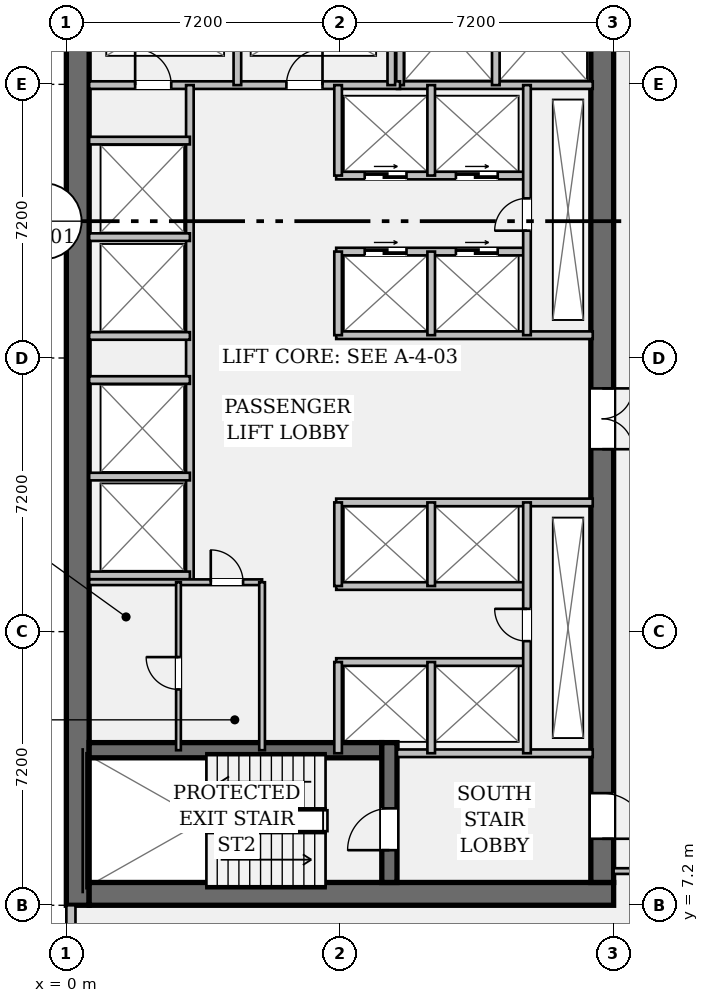
"""IFC4 building model, lengths in metres.
Left out: names, types, materials, properties, quantities, classifications, styles, units other than length and angle.
Written with IfcOpenShell. Run it as: python <this file> out.ifc"""

import sys

from ifc_helpers import new_model, si_unit, direction, frame, frame_2d, origin, place, context, subcontext, project, spatial, rectangle, extrude, element, fill, save


model = new_model("IFC4")
c1 = context("Model", 3, precision=1e-05, world=origin(), true_north=direction((0.0, 1.0)))
c2 = subcontext(c1, "Body", "Model", "MODEL_VIEW")
j1 = project(units=[si_unit("LENGTHUNIT", "METRE"), si_unit("PLANEANGLEUNIT", "RADIAN")], contexts=[c1])
p1 = place(None, origin())
s1 = spatial("IfcSite", under=j1, at=p1, CompositionType="ELEMENT")
p2 = place(p1, origin())
s2 = spatial("IfcBuilding", under=s1, at=p2, CompositionType="ELEMENT")
p3 = place(p2, frame((0.0, 0.0, 5.25)))
s3 = spatial("IfcBuildingStorey", under=s2, at=p3, CompositionType="ELEMENT", Elevation=5.25)
p4 = place(p3, frame((0.3, 7.2, 0.0), z_axis=(0.0, 0.0, 1.0), x_axis=(0.0, 1.0, 0.0)))
e1 = element("IfcWall", 1, at=p4, inside=s3, PredefinedType="SHEAR", context=c2, shape_type="SweptSolid", body=[
    extrude(rectangle(XDim=28.8, YDim=0.6, at=frame_2d((14.4, 0.0))), origin(), (0.0, 0.0, 1.0), 3.9),
])
p5 = place(p3, frame((0.6, 7.5, 0.0), z_axis=(0.0, 0.0, 1.0), x_axis=(1.0, 0.0, 0.0)))
e2 = element("IfcWall", 2, at=p5, inside=s3, PredefinedType="SHEAR", context=c2, shape_type="SweptSolid", body=[
    extrude(rectangle(XDim=13.8, YDim=0.6, at=frame_2d((6.9, 0.0))), origin(), (0.0, 0.0, 1.0), 3.9),
])
p6 = place(p3, frame((14.1, 35.4, 0.0), z_axis=(0.0, 0.0, 1.0), x_axis=(0.0, -1.0, 0.0)))
e3 = element("IfcWall", 3, at=p6, inside=s3, PredefinedType="SHEAR", context=c2, shape_type="SweptSolid", body=[
    extrude(rectangle(XDim=27.6, YDim=0.6, at=frame_2d((13.8, 0.0))), origin(), (0.0, 0.0, 1.0), 3.9),
])
p7 = place(p6, frame((1.3, 0.0, 0.0)))
e4 = element("IfcOpeningElement", 4, at=p7, cuts=e3, PredefinedType="OPENING", context=c2, shape_type="SweptSolid", body=[
    extrude(rectangle(XDim=1.2, YDim=2.15, at=frame_2d((0.6, 1.075))), frame((0.0, 0.312, 0.0), z_axis=(0.0, -1.0, 0.0), x_axis=(1.0, 0.0, 0.0)), (0.0, 0.0, 1.0), 0.624),
])
p8 = place(p6, frame((25.25, 0.0, 0.0)))
e5 = element("IfcOpeningElement", 5, at=p8, cuts=e3, PredefinedType="OPENING", context=c2, shape_type="SweptSolid", body=[
    extrude(rectangle(XDim=1.2, YDim=2.15, at=frame_2d((0.6, 1.075))), frame((0.0, 0.312, 0.0), z_axis=(0.0, -1.0, 0.0), x_axis=(1.0, 0.0, 0.0)), (0.0, 0.0, 1.0), 0.624),
])
p9 = place(p6, frame((14.6, 0.0, 0.0)))
e6 = element("IfcOpeningElement", 6, at=p9, cuts=e3, PredefinedType="OPENING", context=c2, shape_type="SweptSolid", body=[
    extrude(rectangle(XDim=1.6, YDim=2.2, at=frame_2d((0.8, 1.1))), frame((0.0, 0.312, 0.0), z_axis=(0.0, -1.0, 0.0), x_axis=(1.0, 0.0, 0.0)), (0.0, 0.0, 1.0), 0.624),
])
p10 = place(p3, frame((0.6, 11.28, 0.0), z_axis=(0.0, 0.0, 1.0), x_axis=(1.0, 0.0, 0.0)))
e7 = element("IfcWall", 7, at=p10, inside=s3, PredefinedType="SHEAR", context=c2, shape_type="SweptSolid", body=[
    extrude(rectangle(XDim=7.7, YDim=0.4, at=frame_2d((3.85, 0.0))), origin(), (0.0, 0.0, 1.0), 3.9),
])
p11 = place(p3, frame((8.5, 7.8, 0.0), z_axis=(0.0, 0.0, 1.0), x_axis=(0.0, 1.0, 0.0)))
e8 = element("IfcWall", 8, at=p11, inside=s3, PredefinedType="SHEAR", context=c2, shape_type="SweptSolid", body=[
    extrude(rectangle(XDim=3.68, YDim=0.4, at=frame_2d((1.84, 0.0))), origin(), (0.0, 0.0, 1.0), 3.9),
])
p12 = place(p11, frame((0.85, 0.0, 0.0)))
e9 = element("IfcOpeningElement", 9, at=p12, cuts=e8, PredefinedType="OPENING", context=c2, shape_type="SweptSolid", body=[
    extrude(rectangle(XDim=1.1, YDim=2.15, at=frame_2d((0.55, 1.075))), frame((0.0, 0.212, 0.0), z_axis=(0.0, -1.0, 0.0), x_axis=(1.0, 0.0, 0.0)), (0.0, 0.0, 1.0), 0.424),
])
p13 = place(p3, frame((0.12, 2.82, 0.0), z_axis=(0.0, 0.0, 1.0), x_axis=(0.0, 1.0, 0.0)))
e10 = element("IfcWall", 10, at=p13, inside=s3, PredefinedType="STANDARD", context=c2, shape_type="SweptSolid", body=[
    extrude(rectangle(XDim=4.38, YDim=0.24, at=frame_2d((2.19, 0.0))), origin(), (0.0, 0.0, 1.0), 3.9),
])
p14 = place(p13, frame((0.84, 0.0, 0.95)))
e11 = element("IfcOpeningElement", 11, at=p14, cuts=e10, PredefinedType="OPENING", context=c2, shape_type="SweptSolid", body=[
    extrude(rectangle(XDim=2.7, YDim=1.65, at=frame_2d((1.35, 0.825))), frame((0.0, 0.132, 0.0), z_axis=(0.0, -1.0, 0.0), x_axis=(1.0, 0.0, 0.0)), (0.0, 0.0, 1.0), 0.264),
])
for number, where, z_axis, x_axis in (
    (12, (8.7, 11.2, 0.0), (0.0, 0.0, 1.0), (1.0, 0.0, 0.0)),
    (13, (8.7, 28.78, 0.0), (0.0, 0.0, 1.0), (1.0, 0.0, 0.0)),
):
    element("IfcWall", number, at=place(p3, frame(where, z_axis=z_axis, x_axis=x_axis)), inside=s3, PredefinedType="PARTITIONING", context=c2, shape_type="SweptSolid", body=[
        extrude(rectangle(XDim=5.15, YDim=0.2, at=frame_2d((2.575, 0.0))), origin(), (0.0, 0.0, 1.0), 3.9),
    ])
for number, where, z_axis, x_axis in (
    (14, (8.78, 28.78, 0.0), (0.0, 0.0, 1.0), (0.0, 1.0, 0.0)),
    (15, (11.3, 28.78, 0.0), (0.0, 0.0, 1.0), (0.0, 1.0, 0.0)),
):
    element("IfcWall", number, at=place(p3, frame(where, z_axis=z_axis, x_axis=x_axis)), inside=s3, PredefinedType="PARTITIONING", context=c2, shape_type="SweptSolid", body=[
        extrude(rectangle(XDim=3.1, YDim=0.2, at=frame_2d((1.55, 0.0))), origin(), (0.0, 0.0, 1.0), 3.9),
    ])
p15 = place(p3, frame((0.6, 28.78, 0.0), z_axis=(0.0, 0.0, 1.0), x_axis=(1.0, 0.0, 0.0)))
e16 = element("IfcWall", 16, at=p15, inside=s3, PredefinedType="PARTITIONING", context=c2, shape_type="SweptSolid", body=[
    extrude(rectangle(XDim=8.18, YDim=0.2, at=frame_2d((4.09, 0.0))), origin(), (0.0, 0.0, 1.0), 3.9),
])
p16 = place(p15, frame((1.21, 0.0, 0.0)))
e17 = element("IfcOpeningElement", 17, at=p16, cuts=e16, PredefinedType="OPENING", context=c2, shape_type="SweptSolid", body=[
    extrude(rectangle(XDim=0.95, YDim=2.15, at=frame_2d((0.475, 1.075))), frame((0.0, 0.112, 0.0), z_axis=(0.0, -1.0, 0.0), x_axis=(1.0, 0.0, 0.0)), (0.0, 0.0, 1.0), 0.224),
])
p17 = place(p15, frame((5.19, 0.0, 0.0)))
e18 = element("IfcOpeningElement", 18, at=p17, cuts=e16, PredefinedType="OPENING", context=c2, shape_type="SweptSolid", body=[
    extrude(rectangle(XDim=0.95, YDim=2.15, at=frame_2d((0.475, 1.075))), frame((0.0, 0.112, 0.0), z_axis=(0.0, -1.0, 0.0), x_axis=(1.0, 0.0, 0.0)), (0.0, 0.0, 1.0), 0.224),
])
for number, where, z_axis, x_axis in (
    (19, (4.5, 28.78, 0.0), (0.0, 0.0, 1.0), (0.0, 1.0, 0.0)),
    (20, (8.55, 28.78, 0.0), (0.0, 0.0, 1.0), (0.0, 1.0, 0.0)),
):
    element("IfcWall", number, at=place(p3, frame(where, z_axis=z_axis, x_axis=x_axis)), inside=s3, PredefinedType="PARTITIONING", context=c2, shape_type="SweptSolid", body=[
        extrude(rectangle(XDim=2.94, YDim=0.2, at=frame_2d((1.47, 0.0))), origin(), (0.0, 0.0, 1.0), 3.9),
    ])
p18 = place(p3, frame((3.25, 15.7, 0.0), z_axis=(0.0, 0.0, 1.0), x_axis=(0.0, 1.0, 0.0)))
e21 = element("IfcWall", 21, at=p18, inside=s3, PredefinedType="PARTITIONING", context=c2, shape_type="SweptSolid", body=[
    extrude(rectangle(XDim=13.08, YDim=0.2, at=frame_2d((6.54, 0.0))), origin(), (0.0, 0.0, 1.0), 3.9),
])
for number, where, z_axis, x_axis in (
    (22, (0.6, 15.88, 0.0), (0.0, 0.0, 1.0), (1.0, 0.0, 0.0)),
    (23, (0.6, 18.48, 0.0), (0.0, 0.0, 1.0), (1.0, 0.0, 0.0)),
    (24, (0.6, 22.18, 0.0), (0.0, 0.0, 1.0), (1.0, 0.0, 0.0)),
    (25, (0.6, 24.78, 0.0), (0.0, 0.0, 1.0), (1.0, 0.0, 0.0)),
    (26, (0.6, 21.02, 0.0), (0.0, 0.0, 1.0), (1.0, 0.0, 0.0)),
    (27, (0.6, 27.32, 0.0), (0.0, 0.0, 1.0), (1.0, 0.0, 0.0)),
):
    element("IfcWall", number, at=place(p3, frame(where, z_axis=z_axis, x_axis=x_axis)), inside=s3, PredefinedType="PARTITIONING", context=c2, shape_type="SweptSolid", body=[
        extrude(rectangle(XDim=2.65, YDim=0.2, at=frame_2d((1.325, 0.0))), origin(), (0.0, 0.0, 1.0), 3.9),
    ])
p19 = place(p3, frame((7.1, 22.2, 0.0), z_axis=(0.0, 0.0, 1.0), x_axis=(1.0, 0.0, 0.0)))
e28 = element("IfcWall", 28, at=p19, inside=s3, PredefinedType="PARTITIONING", context=c2, shape_type="SweptSolid", body=[
    extrude(rectangle(XDim=6.75, YDim=0.2, at=frame_2d((3.375, 0.0))), origin(), (0.0, 0.0, 1.0), 3.9),
])
p20 = place(p3, frame((7.1, 24.4, 0.0), z_axis=(0.0, 0.0, 1.0), x_axis=(1.0, 0.0, 0.0)))
e29 = element("IfcWall", 29, at=p20, inside=s3, PredefinedType="PARTITIONING", context=c2, shape_type="SweptSolid", body=[
    extrude(rectangle(XDim=5.02, YDim=0.2, at=frame_2d((2.51, 0.0))), origin(), (0.0, 0.0, 1.0), 3.9),
])
p21 = place(p20, frame((0.75, 0.0, 0.0)))
e30 = element("IfcOpeningElement", 30, at=p21, cuts=e29, PredefinedType="OPENING", context=c2, shape_type="SweptSolid", body=[
    extrude(rectangle(XDim=1.1, YDim=2.2, at=frame_2d((0.55, 1.1))), frame((0.0, 0.112, 0.0), z_axis=(0.0, -1.0, 0.0), x_axis=(1.0, 0.0, 0.0)), (0.0, 0.0, 1.0), 0.224),
])
p22 = place(p20, frame((3.15, 0.0, 0.0)))
e31 = element("IfcOpeningElement", 31, at=p22, cuts=e29, PredefinedType="OPENING", context=c2, shape_type="SweptSolid", body=[
    extrude(rectangle(XDim=1.1, YDim=2.2, at=frame_2d((0.55, 1.1))), frame((0.0, 0.112, 0.0), z_axis=(0.0, -1.0, 0.0), x_axis=(1.0, 0.0, 0.0)), (0.0, 0.0, 1.0), 0.224),
])
p23 = place(p3, frame((7.1, 26.4, 0.0), z_axis=(0.0, 0.0, 1.0), x_axis=(1.0, 0.0, 0.0)))
e32 = element("IfcWall", 32, at=p23, inside=s3, PredefinedType="PARTITIONING", context=c2, shape_type="SweptSolid", body=[
    extrude(rectangle(XDim=5.02, YDim=0.2, at=frame_2d((2.51, 0.0))), origin(), (0.0, 0.0, 1.0), 3.9),
])
p24 = place(p23, frame((0.75, 0.0, 0.0)))
e33 = element("IfcOpeningElement", 33, at=p24, cuts=e32, PredefinedType="OPENING", context=c2, shape_type="SweptSolid", body=[
    extrude(rectangle(XDim=1.1, YDim=2.2, at=frame_2d((0.55, 1.1))), frame((0.0, 0.112, 0.0), z_axis=(0.0, -1.0, 0.0), x_axis=(1.0, 0.0, 0.0)), (0.0, 0.0, 1.0), 0.224),
])
p25 = place(p23, frame((3.15, 0.0, 0.0)))
e34 = element("IfcOpeningElement", 34, at=p25, cuts=e32, PredefinedType="OPENING", context=c2, shape_type="SweptSolid", body=[
    extrude(rectangle(XDim=1.1, YDim=2.2, at=frame_2d((0.55, 1.1))), frame((0.0, 0.112, 0.0), z_axis=(0.0, -1.0, 0.0), x_axis=(1.0, 0.0, 0.0)), (0.0, 0.0, 1.0), 0.224),
])
p26 = place(p3, frame((7.15, 22.2, 0.0), z_axis=(0.0, 0.0, 1.0), x_axis=(0.0, 1.0, 0.0)))
e35 = element("IfcWall", 35, at=p26, inside=s3, PredefinedType="PARTITIONING", context=c2, shape_type="SweptSolid", body=[
    extrude(rectangle(XDim=2.2, YDim=0.2, at=frame_2d((1.1, 0.0))), origin(), (0.0, 0.0, 1.0), 3.9),
])
p27 = place(p3, frame((7.15, 26.4, 0.0), z_axis=(0.0, 0.0, 1.0), x_axis=(0.0, 1.0, 0.0)))
e36 = element("IfcWall", 36, at=p27, inside=s3, PredefinedType="PARTITIONING", context=c2, shape_type="SweptSolid", body=[
    extrude(rectangle(XDim=2.38, YDim=0.2, at=frame_2d((1.19, 0.0))), origin(), (0.0, 0.0, 1.0), 3.9),
])
p28 = place(p3, frame((9.6, 22.2, 0.0), z_axis=(0.0, 0.0, 1.0), x_axis=(0.0, 1.0, 0.0)))
e37 = element("IfcWall", 37, at=p28, inside=s3, PredefinedType="PARTITIONING", context=c2, shape_type="SweptSolid", body=[
    extrude(rectangle(XDim=2.2, YDim=0.2, at=frame_2d((1.1, 0.0))), origin(), (0.0, 0.0, 1.0), 3.9),
])
p29 = place(p3, frame((9.6, 26.4, 0.0), z_axis=(0.0, 0.0, 1.0), x_axis=(0.0, 1.0, 0.0)))
e38 = element("IfcWall", 38, at=p29, inside=s3, PredefinedType="PARTITIONING", context=c2, shape_type="SweptSolid", body=[
    extrude(rectangle(XDim=2.38, YDim=0.2, at=frame_2d((1.19, 0.0))), origin(), (0.0, 0.0, 1.0), 3.9),
])
p30 = place(p3, frame((12.12, 22.2, 0.0), z_axis=(0.0, 0.0, 1.0), x_axis=(0.0, 1.0, 0.0)))
e39 = element("IfcWall", 39, at=p30, inside=s3, PredefinedType="PARTITIONING", context=c2, shape_type="SweptSolid", body=[
    extrude(rectangle(XDim=6.58, YDim=0.2, at=frame_2d((3.29, 0.0))), origin(), (0.0, 0.0, 1.0), 3.9),
])
p31 = place(p30, frame((2.75, 0.0, 0.0)))
e40 = element("IfcOpeningElement", 40, at=p31, cuts=e39, PredefinedType="OPENING", context=c2, shape_type="SweptSolid", body=[
    extrude(rectangle(XDim=0.85, YDim=2.15, at=frame_2d((0.425, 1.075))), frame((0.0, 0.112, 0.0), z_axis=(0.0, -1.0, 0.0), x_axis=(1.0, 0.0, 0.0)), (0.0, 0.0, 1.0), 0.224),
])
p32 = place(p3, frame((7.1, 17.8, 0.0), z_axis=(0.0, 0.0, 1.0), x_axis=(1.0, 0.0, 0.0)))
e41 = element("IfcWall", 41, at=p32, inside=s3, PredefinedType="PARTITIONING", context=c2, shape_type="SweptSolid", body=[
    extrude(rectangle(XDim=6.75, YDim=0.2, at=frame_2d((3.375, 0.0))), origin(), (0.0, 0.0, 1.0), 3.9),
])
for number, where, z_axis, x_axis in (
    (42, (7.1, 15.6, 0.0), (0.0, 0.0, 1.0), (1.0, 0.0, 0.0)),
    (43, (7.1, 13.6, 0.0), (0.0, 0.0, 1.0), (1.0, 0.0, 0.0)),
):
    element("IfcWall", number, at=place(p3, frame(where, z_axis=z_axis, x_axis=x_axis)), inside=s3, PredefinedType="PARTITIONING", context=c2, shape_type="SweptSolid", body=[
        extrude(rectangle(XDim=5.02, YDim=0.2, at=frame_2d((2.51, 0.0))), origin(), (0.0, 0.0, 1.0), 3.9),
    ])
p33 = place(p3, frame((7.15, 15.6, 0.0), z_axis=(0.0, 0.0, 1.0), x_axis=(0.0, 1.0, 0.0)))
e44 = element("IfcWall", 44, at=p33, inside=s3, PredefinedType="PARTITIONING", context=c2, shape_type="SweptSolid", body=[
    extrude(rectangle(XDim=2.2, YDim=0.2, at=frame_2d((1.1, 0.0))), origin(), (0.0, 0.0, 1.0), 3.9),
])
p34 = place(p3, frame((7.15, 11.2, 0.0), z_axis=(0.0, 0.0, 1.0), x_axis=(0.0, 1.0, 0.0)))
e45 = element("IfcWall", 45, at=p34, inside=s3, PredefinedType="PARTITIONING", context=c2, shape_type="SweptSolid", body=[
    extrude(rectangle(XDim=2.4, YDim=0.2, at=frame_2d((1.2, 0.0))), origin(), (0.0, 0.0, 1.0), 3.9),
])
p35 = place(p3, frame((9.6, 15.6, 0.0), z_axis=(0.0, 0.0, 1.0), x_axis=(0.0, 1.0, 0.0)))
e46 = element("IfcWall", 46, at=p35, inside=s3, PredefinedType="PARTITIONING", context=c2, shape_type="SweptSolid", body=[
    extrude(rectangle(XDim=2.2, YDim=0.2, at=frame_2d((1.1, 0.0))), origin(), (0.0, 0.0, 1.0), 3.9),
])
p36 = place(p3, frame((9.6, 11.2, 0.0), z_axis=(0.0, 0.0, 1.0), x_axis=(0.0, 1.0, 0.0)))
e47 = element("IfcWall", 47, at=p36, inside=s3, PredefinedType="PARTITIONING", context=c2, shape_type="SweptSolid", body=[
    extrude(rectangle(XDim=2.4, YDim=0.2, at=frame_2d((1.2, 0.0))), origin(), (0.0, 0.0, 1.0), 3.9),
])
p37 = place(p3, frame((12.12, 11.2, 0.0), z_axis=(0.0, 0.0, 1.0), x_axis=(0.0, 1.0, 0.0)))
e48 = element("IfcWall", 48, at=p37, inside=s3, PredefinedType="PARTITIONING", context=c2, shape_type="SweptSolid", body=[
    extrude(rectangle(XDim=6.6, YDim=0.2, at=frame_2d((3.3, 0.0))), origin(), (0.0, 0.0, 1.0), 3.9),
])
p38 = place(p37, frame((2.95, 0.0, 0.0)))
e49 = element("IfcOpeningElement", 49, at=p38, cuts=e48, PredefinedType="OPENING", context=c2, shape_type="SweptSolid", body=[
    extrude(rectangle(XDim=0.85, YDim=2.15, at=frame_2d((0.425, 1.075))), frame((0.0, 0.112, 0.0), z_axis=(0.0, -1.0, 0.0), x_axis=(1.0, 0.0, 0.0)), (0.0, 0.0, 1.0), 0.224),
])
p39 = place(p3, frame((0.6, 15.7, 0.0), z_axis=(0.0, 0.0, 1.0), x_axis=(1.0, 0.0, 0.0)))
e50 = element("IfcWall", 50, at=p39, inside=s3, PredefinedType="PARTITIONING", context=c2, shape_type="SweptSolid", body=[
    extrude(rectangle(XDim=4.55, YDim=0.15, at=frame_2d((2.275, 0.0))), origin(), (0.0, 0.0, 1.0), 3.9),
])
p40 = place(p39, frame((3.2, 0.0, 0.0)))
e51 = element("IfcOpeningElement", 51, at=p40, cuts=e50, PredefinedType="OPENING", context=c2, shape_type="SweptSolid", body=[
    extrude(rectangle(XDim=0.85, YDim=2.15, at=frame_2d((0.425, 1.075))), frame((0.0, 0.087, 0.0), z_axis=(0.0, -1.0, 0.0), x_axis=(1.0, 0.0, 0.0)), (0.0, 0.0, 1.0), 0.174),
])
p41 = place(p3, frame((5.15, 11.28, 0.0), z_axis=(0.0, 0.0, 1.0), x_axis=(0.0, 1.0, 0.0)))
e52 = element("IfcWall", 52, at=p41, inside=s3, PredefinedType="PARTITIONING", context=c2, shape_type="SweptSolid", body=[
    extrude(rectangle(XDim=4.42, YDim=0.15, at=frame_2d((2.21, 0.0))), origin(), (0.0, 0.0, 1.0), 3.9),
])
p42 = place(p3, frame((2.95, 11.28, 0.0), z_axis=(0.0, 0.0, 1.0), x_axis=(0.0, 1.0, 0.0)))
e53 = element("IfcWall", 53, at=p42, inside=s3, PredefinedType="PARTITIONING", context=c2, shape_type="SweptSolid", body=[
    extrude(rectangle(XDim=4.42, YDim=0.125, at=frame_2d((2.21, 0.0))), origin(), (0.0, 0.0, 1.0), 3.9),
])
p43 = place(p42, frame((1.6, 0.0, 0.0)))
e54 = element("IfcOpeningElement", 54, at=p43, cuts=e53, PredefinedType="OPENING", context=c2, shape_type="SweptSolid", body=[
    extrude(rectangle(XDim=0.85, YDim=2.15, at=frame_2d((0.425, 1.075))), frame((0.0, 0.074, 0.0), z_axis=(0.0, -1.0, 0.0), x_axis=(1.0, 0.0, 0.0)), (0.0, 0.0, 1.0), 0.149),
])
p44 = place(p3, frame((14.4, 8.1, 0.0), z_axis=(0.0, 0.0, 1.0), x_axis=(1.0, 0.0, 0.0)))
e55 = element("IfcWall", 55, at=p44, inside=s3, PredefinedType="PARTITIONING", context=c2, shape_type="SweptSolid", body=[
    extrude(rectangle(XDim=55.6, YDim=0.15, at=frame_2d((27.8, 0.0))), origin(), (0.0, 0.0, 1.0), 2.938),
])
p45 = place(p44, frame((1.1, 0.0, 0.0)))
e56 = element("IfcOpeningElement", 56, at=p45, cuts=e55, PredefinedType="OPENING", context=c2, shape_type="SweptSolid", body=[
    extrude(rectangle(XDim=1.0, YDim=2.15, at=frame_2d((0.5, 1.075))), frame((0.0, 0.087, 0.0), z_axis=(0.0, -1.0, 0.0), x_axis=(1.0, 0.0, 0.0)), (0.0, 0.0, 1.0), 0.174),
])
p46 = place(p12, origin())
e57 = element("IfcDoor", 57, at=p46, inside=s3, OperationType="SINGLE_SWING_LEFT", PredefinedType="DOOR", context=c2, shape_type="SweptSolid", body=[
    extrude(rectangle(XDim=1.1, YDim=2.15, at=frame_2d((0.55, 1.075))), frame((0.0, 0.025, 0.0), z_axis=(0.0, -1.0, 0.0), x_axis=(1.0, 0.0, 0.0)), (0.0, 0.0, 1.0), 0.05),
])
fill(e9, e57)
p47 = place(p8, origin())
e58 = element("IfcDoor", 58, at=p47, inside=s3, OperationType="SINGLE_SWING_RIGHT", PredefinedType="DOOR", context=c2, shape_type="SweptSolid", body=[
    extrude(rectangle(XDim=1.2, YDim=2.15, at=frame_2d((0.6, 1.075))), frame((0.0, 0.025, 0.0), z_axis=(0.0, -1.0, 0.0), x_axis=(1.0, 0.0, 0.0)), (0.0, 0.0, 1.0), 0.05),
])
fill(e5, e58)
p48 = place(p16, origin())
e59 = element("IfcDoor", 59, at=p48, inside=s3, OperationType="SINGLE_SWING_LEFT", PredefinedType="DOOR", context=c2, shape_type="SweptSolid", body=[
    extrude(rectangle(XDim=0.95, YDim=2.15, at=frame_2d((0.475, 1.075))), frame((0.0, 0.025, 0.0), z_axis=(0.0, -1.0, 0.0), x_axis=(1.0, 0.0, 0.0)), (0.0, 0.0, 1.0), 0.05),
])
fill(e17, e59)
p49 = place(p17, origin())
e60 = element("IfcDoor", 60, at=p49, inside=s3, OperationType="SINGLE_SWING_RIGHT", PredefinedType="DOOR", context=c2, shape_type="SweptSolid", body=[
    extrude(rectangle(XDim=0.95, YDim=2.15, at=frame_2d((0.475, 1.075))), frame((0.0, 0.025, 0.0), z_axis=(0.0, -1.0, 0.0), x_axis=(1.0, 0.0, 0.0)), (0.0, 0.0, 1.0), 0.05),
])
fill(e18, e60)
p50 = place(p9, origin())
e61 = element("IfcDoor", 61, at=p50, inside=s3, OperationType="DOUBLE_DOOR_SINGLE_SWING", PredefinedType="DOOR", context=c2, shape_type="SweptSolid", body=[
    extrude(rectangle(XDim=1.6, YDim=2.2, at=frame_2d((0.8, 1.1))), frame((0.0, 0.025, 0.0), z_axis=(0.0, -1.0, 0.0), x_axis=(1.0, 0.0, 0.0)), (0.0, 0.0, 1.0), 0.05),
])
fill(e6, e61)
p51 = place(p31, origin())
e62 = element("IfcDoor", 62, at=p51, inside=s3, OperationType="SINGLE_SWING_LEFT", PredefinedType="DOOR", context=c2, shape_type="SweptSolid", body=[
    extrude(rectangle(XDim=0.85, YDim=2.15, at=frame_2d((0.425, 1.075))), frame((0.0, 0.025, 0.0), z_axis=(0.0, -1.0, 0.0), x_axis=(1.0, 0.0, 0.0)), (0.0, 0.0, 1.0), 0.05),
])
fill(e40, e62)
p52 = place(p21, origin())
e63 = element("IfcDoor", 63, at=p52, inside=s3, OperationType="DOUBLE_DOOR_SLIDING", PredefinedType="DOOR", context=c2, shape_type="SweptSolid", body=[
    extrude(rectangle(XDim=1.1, YDim=2.2, at=frame_2d((0.55, 1.1))), frame((0.0, 0.025, 0.0), z_axis=(0.0, -1.0, 0.0), x_axis=(1.0, 0.0, 0.0)), (0.0, 0.0, 1.0), 0.05),
])
fill(e30, e63)
p53 = place(p22, origin())
e64 = element("IfcDoor", 64, at=p53, inside=s3, OperationType="DOUBLE_DOOR_SLIDING", PredefinedType="DOOR", context=c2, shape_type="SweptSolid", body=[
    extrude(rectangle(XDim=1.1, YDim=2.2, at=frame_2d((0.55, 1.1))), frame((0.0, 0.025, 0.0), z_axis=(0.0, -1.0, 0.0), x_axis=(1.0, 0.0, 0.0)), (0.0, 0.0, 1.0), 0.05),
])
fill(e31, e64)
p54 = place(p24, origin())
e65 = element("IfcDoor", 65, at=p54, inside=s3, OperationType="DOUBLE_DOOR_SLIDING", PredefinedType="DOOR", context=c2, shape_type="SweptSolid", body=[
    extrude(rectangle(XDim=1.1, YDim=2.2, at=frame_2d((0.55, 1.1))), frame((0.0, 0.025, 0.0), z_axis=(0.0, -1.0, 0.0), x_axis=(1.0, 0.0, 0.0)), (0.0, 0.0, 1.0), 0.05),
])
fill(e33, e65)
p55 = place(p25, origin())
e66 = element("IfcDoor", 66, at=p55, inside=s3, OperationType="DOUBLE_DOOR_SLIDING", PredefinedType="DOOR", context=c2, shape_type="SweptSolid", body=[
    extrude(rectangle(XDim=1.1, YDim=2.2, at=frame_2d((0.55, 1.1))), frame((0.0, 0.025, 0.0), z_axis=(0.0, -1.0, 0.0), x_axis=(1.0, 0.0, 0.0)), (0.0, 0.0, 1.0), 0.05),
])
fill(e34, e66)
p56 = place(p38, origin())
e67 = element("IfcDoor", 67, at=p56, inside=s3, OperationType="SINGLE_SWING_RIGHT", PredefinedType="DOOR", context=c2, shape_type="SweptSolid", body=[
    extrude(rectangle(XDim=0.85, YDim=2.15, at=frame_2d((0.425, 1.075))), frame((0.0, 0.025, 0.0), z_axis=(0.0, -1.0, 0.0), x_axis=(1.0, 0.0, 0.0)), (0.0, 0.0, 1.0), 0.05),
])
fill(e49, e67)
p57 = place(p40, origin())
e68 = element("IfcDoor", 68, at=p57, inside=s3, OperationType="SINGLE_SWING_LEFT", PredefinedType="DOOR", context=c2, shape_type="SweptSolid", body=[
    extrude(rectangle(XDim=0.85, YDim=2.15, at=frame_2d((0.425, 1.075))), frame((0.0, 0.025, 0.0), z_axis=(0.0, -1.0, 0.0), x_axis=(1.0, 0.0, 0.0)), (0.0, 0.0, 1.0), 0.05),
])
fill(e51, e68)
p58 = place(p43, origin())
e69 = element("IfcDoor", 69, at=p58, inside=s3, OperationType="SINGLE_SWING_RIGHT", PredefinedType="DOOR", context=c2, shape_type="SweptSolid", body=[
    extrude(rectangle(XDim=0.85, YDim=2.15, at=frame_2d((0.425, 1.075))), frame((0.0, 0.025, 0.0), z_axis=(0.0, -1.0, 0.0), x_axis=(1.0, 0.0, 0.0)), (0.0, 0.0, 1.0), 0.05),
])
fill(e54, e69)
save(model, sys.argv[1])
